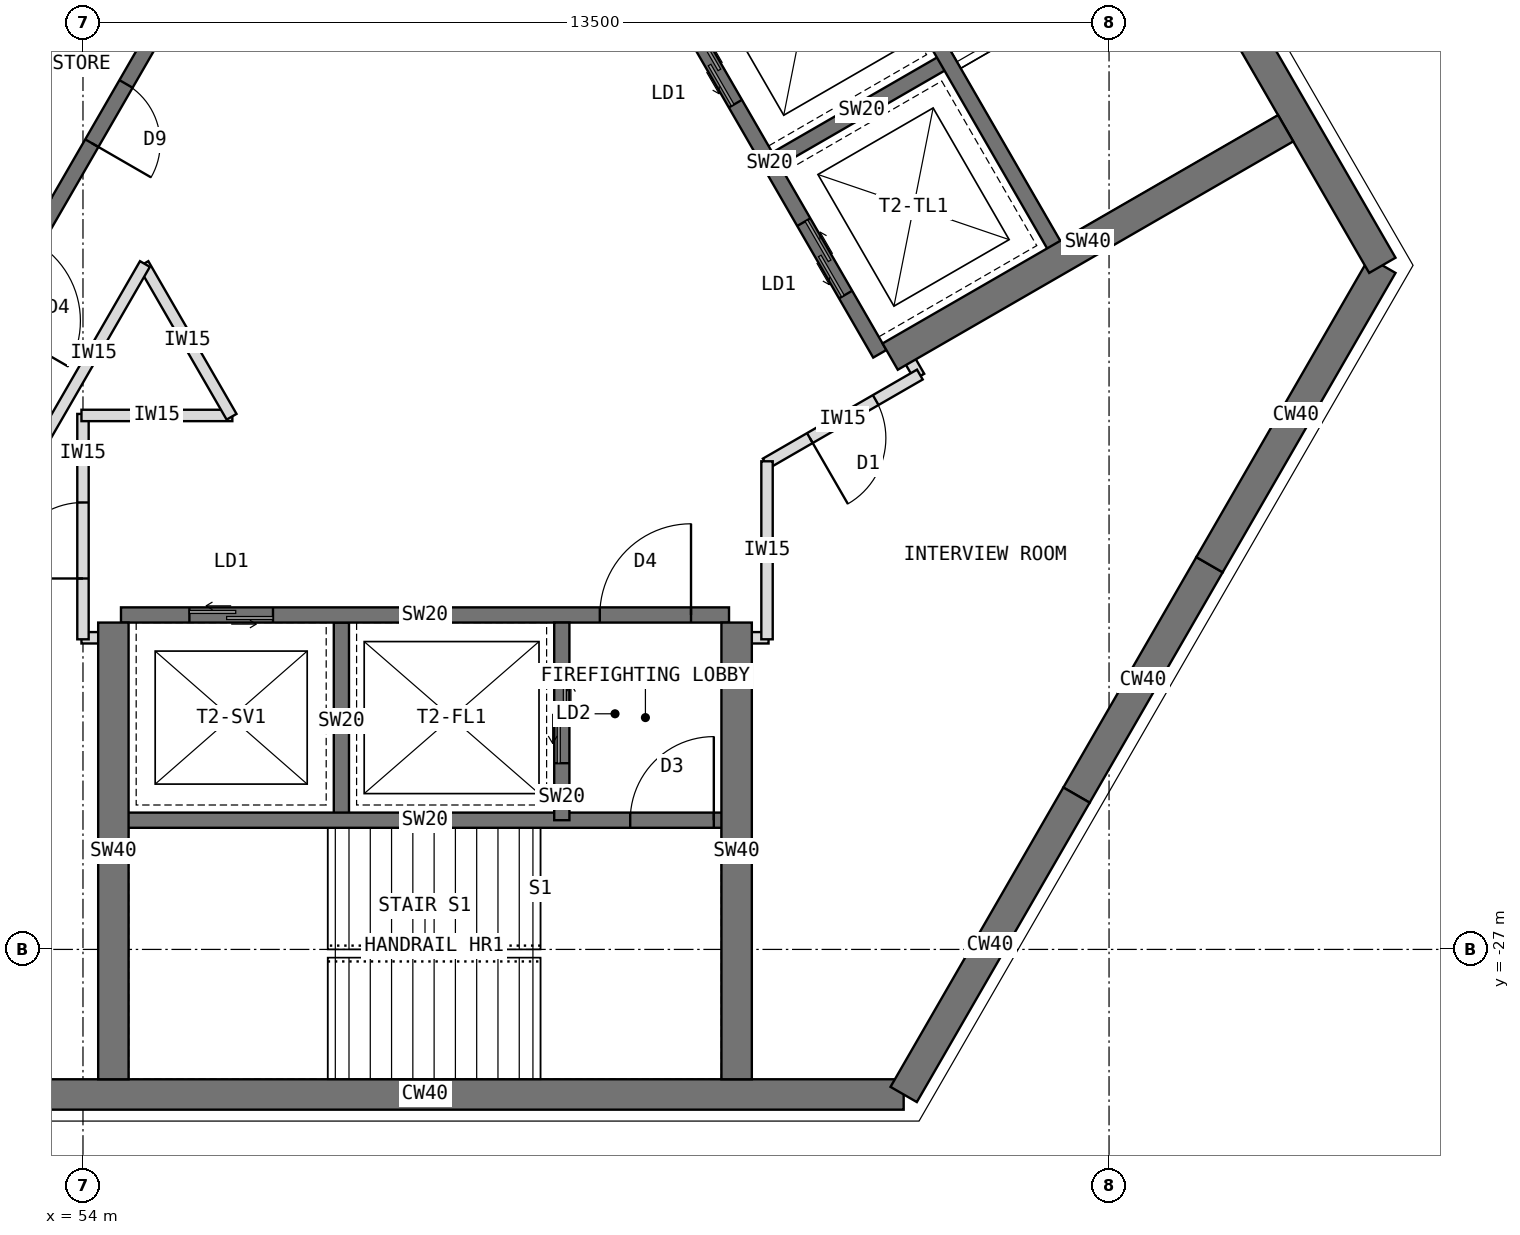
"""IFC4 building model, lengths in metres.
Left out: names, types, materials, properties, quantities, classifications, styles, units other than length and angle.
Written with IfcOpenShell. Run it as: python <this file> out.ifc"""

import sys

from ifc_helpers import new_model, si_unit, direction, frame, frame_2d, origin, place, context, subcontext, project, spatial, rectangle, extrude, element, fill, save


model = new_model("IFC4")
c1 = context("Model", 3, precision=1e-05, world=origin(), true_north=direction((0.0, 1.0)))
c2 = subcontext(c1, "Body", "Model", "MODEL_VIEW")
j1 = project(units=[si_unit("LENGTHUNIT", "METRE"), si_unit("PLANEANGLEUNIT", "RADIAN")], contexts=[c1])
p1 = place(None, origin())
s1 = spatial("IfcSite", under=j1, at=p1, CompositionType="ELEMENT")
p2 = place(p1, origin())
s2 = spatial("IfcBuilding", under=s1, at=p2, CompositionType="ELEMENT")
p3 = place(p2, frame((0.0, 0.0, 259.5)))
s3 = spatial("IfcBuildingStorey", under=s2, at=p3, CompositionType="ELEMENT", Elevation=259.5)
p4 = place(p3, frame((52.202, -28.908, 0.0), z_axis=(0.0, 0.0, 1.0), x_axis=(1.0, 0.0, 0.0)))
e1 = element("IfcWall", 1, at=p4, inside=s3, PredefinedType="SHEAR", context=c2, shape_type="SweptSolid", body=[
    extrude(rectangle(XDim=12.596, YDim=0.4, at=frame_2d((6.298, 0.0))), origin(), (0.0, 0.0, 1.0), 4.0),
])
p5 = place(p3, frame((64.798, -28.908, 0.0), z_axis=(0.0, 0.0, 1.0), x_axis=(0.499984222037, 0.866034513004, 0.0)))
e2 = element("IfcWall", 2, at=p5, inside=s3, PredefinedType="SHEAR", context=c2, shape_type="SweptSolid", body=[
    extrude(rectangle(XDim=4.548, YDim=0.4, at=frame_2d((2.274, 0.0))), origin(), (0.0, 0.0, 1.0), 4.0),
])
p6 = place(p3, frame((67.072, -24.97, 0.0), z_axis=(0.0, 0.0, 1.0), x_axis=(0.500010275428, 0.866019471182, 0.0)))
e3 = element("IfcWall", 3, at=p6, inside=s3, PredefinedType="SHEAR", context=c2, shape_type="SweptSolid", body=[
    extrude(rectangle(XDim=3.5, YDim=0.4, at=frame_2d((1.75, 0.0))), origin(), (0.0, 0.0, 1.0), 4.0),
])
p7 = place(p3, frame((68.822, -21.939, 0.0), z_axis=(0.0, 0.0, 1.0), x_axis=(0.500024481964, 0.866011268655, 0.0)))
e4 = element("IfcWall", 4, at=p7, inside=s3, PredefinedType="SHEAR", context=c2, shape_type="SweptSolid", body=[
    extrude(rectangle(XDim=4.548, YDim=0.4, at=frame_2d((2.274, 0.0))), origin(), (0.0, 0.0, 1.0), 4.0),
])
p8 = place(p3, frame((71.096, -18.0, 0.0), z_axis=(0.0, 0.0, 1.0), x_axis=(-0.500005998175, 0.866021940709, 0.0)))
e5 = element("IfcWall", 5, at=p8, inside=s3, PredefinedType="SHEAR", context=c2, shape_type="SweptSolid", body=[
    extrude(rectangle(XDim=12.596, YDim=0.4, at=frame_2d((6.298, 0.0))), origin(), (0.0, 0.0, 1.0), 4.0),
])
p9 = place(p3, frame((56.516, -12.236, 0.0), z_axis=(0.0, 0.0, 1.0), x_axis=(-0.49999894854, -0.866026010844, 0.0)))
e6 = element("IfcWall", 6, at=p9, inside=s3, PredefinedType="SHEAR", context=c2, shape_type="SweptSolid", body=[
    extrude(rectangle(XDim=8.0, YDim=0.2, at=frame_2d((4.0, 0.0))), origin(), (0.0, 0.0, 1.0), 4.0),
])
p10 = place(p9, frame((6.3, 0.0, 0.0)))
e7 = element("IfcOpeningElement", 7, at=p10, cuts=e6, PredefinedType="OPENING", context=c2, shape_type="SweptSolid", body=[
    extrude(rectangle(XDim=1.2, YDim=2.1, at=frame_2d((0.6, 1.05))), frame((0.0, 0.11, 0.0), z_axis=(0.0, -1.0, 0.0), x_axis=(1.0, 0.0, 0.0)), (0.0, 0.0, 1.0), 0.22),
])
p11 = place(p9, frame((1.0, 0.0, 0.0)))
e8 = element("IfcOpeningElement", 8, at=p11, cuts=e6, PredefinedType="OPENING", context=c2, shape_type="SweptSolid", body=[
    extrude(rectangle(XDim=0.9, YDim=2.1, at=frame_2d((0.45, 1.05))), frame((0.0, 0.11, 0.0), z_axis=(0.0, -1.0, 0.0), x_axis=(1.0, 0.0, 0.0)), (0.0, 0.0, 1.0), 0.22),
])
p12 = place(p9, frame((3.9, 0.0, 0.0)))
e9 = element("IfcOpeningElement", 9, at=p12, cuts=e6, PredefinedType="OPENING", context=c2, shape_type="SweptSolid", body=[
    extrude(rectangle(XDim=0.9, YDim=2.1, at=frame_2d((0.45, 1.05))), frame((0.0, 0.11, 0.0), z_axis=(0.0, -1.0, 0.0), x_axis=(1.0, 0.0, 0.0)), (0.0, 0.0, 1.0), 0.22),
])
p13 = place(p3, frame((54.178, -10.886, 0.0), z_axis=(0.0, 0.0, 1.0), x_axis=(-0.49999894854, -0.866026010844, 0.0)))
e10 = element("IfcWall", 10, at=p13, inside=s3, PredefinedType="SHEAR", context=c2, shape_type="SweptSolid", body=[
    extrude(rectangle(XDim=8.0, YDim=0.2, at=frame_2d((4.0, 0.0))), origin(), (0.0, 0.0, 1.0), 4.0),
])
p14 = place(p13, frame((6.8, 0.0, 0.0)))
e11 = element("IfcOpeningElement", 11, at=p14, cuts=e10, PredefinedType="OPENING", context=c2, shape_type="SweptSolid", body=[
    extrude(rectangle(XDim=0.9, YDim=2.1, at=frame_2d((0.45, 1.05))), frame((0.0, 0.11, 0.0), z_axis=(0.0, -1.0, 0.0), x_axis=(1.0, 0.0, 0.0)), (0.0, 0.0, 1.0), 0.22),
])
p15 = place(p3, frame((54.5, -22.6, 0.0), z_axis=(0.0, 0.0, 1.0), x_axis=(1.0, 0.0, 0.0)))
e12 = element("IfcWall", 12, at=p15, inside=s3, PredefinedType="SHEAR", context=c2, shape_type="SweptSolid", body=[
    extrude(rectangle(XDim=8.0, YDim=0.2, at=frame_2d((4.0, 0.0))), origin(), (0.0, 0.0, 1.0), 4.0),
])
p16 = place(p15, frame((6.3, 0.0, 0.0)))
e13 = element("IfcOpeningElement", 13, at=p16, cuts=e12, PredefinedType="OPENING", context=c2, shape_type="SweptSolid", body=[
    extrude(rectangle(XDim=1.2, YDim=2.1, at=frame_2d((0.6, 1.05))), frame((0.0, 0.11, 0.0), z_axis=(0.0, -1.0, 0.0), x_axis=(1.0, 0.0, 0.0)), (0.0, 0.0, 1.0), 0.22),
])
p17 = place(p15, frame((0.9, 0.0, 0.0)))
e14 = element("IfcOpeningElement", 14, at=p17, cuts=e12, PredefinedType="OPENING", context=c2, shape_type="SweptSolid", body=[
    extrude(rectangle(XDim=1.1, YDim=2.2, at=frame_2d((0.55, 1.1))), frame((0.0, 0.11, 0.0), z_axis=(0.0, -1.0, 0.0), x_axis=(1.0, 0.0, 0.0)), (0.0, 0.0, 1.0), 0.22),
])
p18 = place(p3, frame((57.4, -22.7, 0.0), z_axis=(0.0, 0.0, 1.0), x_axis=(0.0, -1.0, 0.0)))
e15 = element("IfcWall", 15, at=p18, inside=s3, PredefinedType="SHEAR", context=c2, shape_type="SweptSolid", body=[
    extrude(rectangle(XDim=2.6, YDim=0.2, at=frame_2d((1.3, 0.0))), origin(), (0.0, 0.0, 1.0), 4.0),
])
p19 = place(p3, frame((60.3, -22.7, 0.0), z_axis=(0.0, 0.0, 1.0), x_axis=(0.0, -1.0, 0.0)))
e16 = element("IfcWall", 16, at=p19, inside=s3, PredefinedType="SHEAR", context=c2, shape_type="SweptSolid", body=[
    extrude(rectangle(XDim=2.6, YDim=0.2, at=frame_2d((1.3, 0.0))), origin(), (0.0, 0.0, 1.0), 4.0),
])
p20 = place(p19, frame((0.55, 0.0, 0.0)))
e17 = element("IfcOpeningElement", 17, at=p20, cuts=e16, PredefinedType="OPENING", context=c2, shape_type="SweptSolid", body=[
    extrude(rectangle(XDim=1.3, YDim=2.2, at=frame_2d((0.65, 1.1))), frame((0.0, 0.11, 0.0), z_axis=(0.0, -1.0, 0.0), x_axis=(1.0, 0.0, 0.0)), (0.0, 0.0, 1.0), 0.22),
])
p21 = place(p3, frame((54.5, -25.3, 0.0), z_axis=(0.0, 0.0, 1.0), x_axis=(1.0, 0.0, 0.0)))
e18 = element("IfcWall", 18, at=p21, inside=s3, PredefinedType="SHEAR", context=c2, shape_type="SweptSolid", body=[
    extrude(rectangle(XDim=8.0, YDim=0.2, at=frame_2d((4.0, 0.0))), origin(), (0.0, 0.0, 1.0), 4.0),
])
p22 = place(p21, frame((6.7, 0.0, 0.0)))
e19 = element("IfcOpeningElement", 19, at=p22, cuts=e18, PredefinedType="OPENING", context=c2, shape_type="SweptSolid", body=[
    extrude(rectangle(XDim=1.1, YDim=2.1, at=frame_2d((0.55, 1.05))), frame((0.0, 0.11, 0.0), z_axis=(0.0, -1.0, 0.0), x_axis=(1.0, 0.0, 0.0)), (0.0, 0.0, 1.0), 0.22),
])
for number, where, z_axis, x_axis in (
    (20, (62.6, -22.7, 0.0), (0.0, 0.0, 1.0), (0.0, -1.0, 0.0)),
    (21, (54.4, -22.7, 0.0), (0.0, 0.0, 1.0), (0.0, -1.0, 0.0)),
):
    element("IfcWall", number, at=place(p3, frame(where, z_axis=z_axis, x_axis=x_axis)), inside=s3, PredefinedType="SHEAR", context=c2, shape_type="SweptSolid", body=[
        extrude(rectangle(XDim=6.008, YDim=0.4, at=frame_2d((3.004, 0.0))), origin(), (0.0, 0.0, 1.0), 4.0),
    ])
p23 = place(p3, frame((64.484, -19.164, 0.0), z_axis=(0.0, 0.0, 1.0), x_axis=(-0.49999894854, 0.866026010844, 0.0)))
e22 = element("IfcWall", 22, at=p23, inside=s3, PredefinedType="SHEAR", context=c2, shape_type="SweptSolid", body=[
    extrude(rectangle(XDim=8.0, YDim=0.2, at=frame_2d((4.0, 0.0))), origin(), (0.0, 0.0, 1.0), 4.0),
])
p24 = place(p23, frame((6.3, 0.0, 0.0)))
e23 = element("IfcOpeningElement", 23, at=p24, cuts=e22, PredefinedType="OPENING", context=c2, shape_type="SweptSolid", body=[
    extrude(rectangle(XDim=1.2, YDim=2.1, at=frame_2d((0.6, 1.05))), frame((0.0, 0.11, 0.0), z_axis=(0.0, -1.0, 0.0), x_axis=(1.0, 0.0, 0.0)), (0.0, 0.0, 1.0), 0.22),
])
p25 = place(p23, frame((0.9, 0.0, 0.0)))
e24 = element("IfcOpeningElement", 24, at=p25, cuts=e22, PredefinedType="OPENING", context=c2, shape_type="SweptSolid", body=[
    extrude(rectangle(XDim=1.1, YDim=2.2, at=frame_2d((0.55, 1.1))), frame((0.0, 0.11, 0.0), z_axis=(0.0, -1.0, 0.0), x_axis=(1.0, 0.0, 0.0)), (0.0, 0.0, 1.0), 0.22),
])
p26 = place(p23, frame((3.8, 0.0, 0.0)))
e25 = element("IfcOpeningElement", 25, at=p26, cuts=e22, PredefinedType="OPENING", context=c2, shape_type="SweptSolid", body=[
    extrude(rectangle(XDim=1.1, YDim=2.2, at=frame_2d((0.55, 1.1))), frame((0.0, 0.11, 0.0), z_axis=(0.0, -1.0, 0.0), x_axis=(1.0, 0.0, 0.0)), (0.0, 0.0, 1.0), 0.22),
])
p27 = place(p3, frame((63.12, -16.603, 0.0), z_axis=(0.0, 0.0, 1.0), x_axis=(0.866062058628, 0.499936506574, 0.0)))
e26 = element("IfcWall", 26, at=p27, inside=s3, PredefinedType="SHEAR", context=c2, shape_type="SweptSolid", body=[
    extrude(rectangle(XDim=2.6, YDim=0.2, at=frame_2d((1.3, 0.0))), origin(), (0.0, 0.0, 1.0), 4.0),
])
p28 = place(p3, frame((66.822, -17.814, 0.0), z_axis=(0.0, 0.0, 1.0), x_axis=(-0.49999894854, 0.866026010844, 0.0)))
e27 = element("IfcWall", 27, at=p28, inside=s3, PredefinedType="SHEAR", context=c2, shape_type="SweptSolid", body=[
    extrude(rectangle(XDim=8.0, YDim=0.2, at=frame_2d((4.0, 0.0))), origin(), (0.0, 0.0, 1.0), 4.0),
])
p29 = place(p28, frame((6.7, 0.0, 0.0)))
e28 = element("IfcOpeningElement", 28, at=p29, cuts=e27, PredefinedType="OPENING", context=c2, shape_type="SweptSolid", body=[
    extrude(rectangle(XDim=1.1, YDim=2.1, at=frame_2d((0.55, 1.05))), frame((0.0, 0.11, 0.0), z_axis=(0.0, -1.0, 0.0), x_axis=(1.0, 0.0, 0.0)), (0.0, 0.0, 1.0), 0.22),
])
p30 = place(p3, frame((64.62, -19.201, 0.0), z_axis=(0.0, 0.0, 1.0), x_axis=(0.866026570101, 0.499997979876, 0.0)))
e29 = element("IfcWall", 29, at=p30, inside=s3, PredefinedType="SHEAR", context=c2, shape_type="SweptSolid", body=[
    extrude(rectangle(XDim=6.008, YDim=0.4, at=frame_2d((3.004, 0.0))), origin(), (0.0, 0.0, 1.0), 4.0),
])
for number, where, z_axis, x_axis in (
    (30, (63.02, -22.9, 0.0), (0.0, 0.0, 1.0), (-1.0, 0.0, 0.0)),
    (31, (54.41, -22.9, 0.0), (0.0, 0.0, 1.0), (-1.0, 0.0, 0.0)),
):
    element("IfcWall", number, at=place(p3, frame(where, z_axis=z_axis, x_axis=x_axis)), inside=s3, PredefinedType="PARTITIONING", context=c2, shape_type="SweptSolid", body=[
        extrude(rectangle(XDim=0.43, YDim=0.15, at=frame_2d((0.215, 0.0))), origin(), (0.0, 0.0, 1.0), 3.8),
    ])
p31 = place(p3, frame((54.0, -22.92, 0.0), z_axis=(0.0, 0.0, 1.0), x_axis=(0.0, 1.0, 0.0)))
e32 = element("IfcWall", 32, at=p31, inside=s3, PredefinedType="PARTITIONING", context=c2, shape_type="SweptSolid", body=[
    extrude(rectangle(XDim=2.965, YDim=0.15, at=frame_2d((1.482, 0.0))), origin(), (0.0, 0.0, 1.0), 3.8),
])
p32 = place(p31, frame((0.8, 0.0, 0.0)))
e33 = element("IfcOpeningElement", 33, at=p32, cuts=e32, PredefinedType="OPENING", context=c2, shape_type="SweptSolid", body=[
    extrude(rectangle(XDim=1.0, YDim=2.1, at=frame_2d((0.5, 1.05))), frame((0.0, 0.085, 0.0), z_axis=(0.0, -1.0, 0.0), x_axis=(1.0, 0.0, 0.0)), (0.0, 0.0, 1.0), 0.17),
])
p33 = place(p3, frame((53.98, -19.975, 0.0), z_axis=(0.0, 0.0, 1.0), x_axis=(1.0, 0.0, 0.0)))
e34 = element("IfcWall", 34, at=p33, inside=s3, PredefinedType="PARTITIONING", context=c2, shape_type="SweptSolid", body=[
    extrude(rectangle(XDim=1.985, YDim=0.15, at=frame_2d((0.993, 0.0))), origin(), (0.0, 0.0, 1.0), 3.8),
])
p34 = place(p3, frame((55.955, -19.992, 0.0), z_axis=(0.0, 0.0, 1.0), x_axis=(-0.499941024108, 0.866059450854, 0.0)))
e35 = element("IfcWall", 35, at=p34, inside=s3, PredefinedType="PARTITIONING", context=c2, shape_type="SweptSolid", body=[
    extrude(rectangle(XDim=2.321, YDim=0.15, at=frame_2d((1.16, 0.0))), origin(), (0.0, 0.0, 1.0), 3.8),
])
p35 = place(p3, frame((54.815, -17.983, 0.0), z_axis=(0.0, 0.0, 1.0), x_axis=(-0.499981473571, -0.866036099759, 0.0)))
e36 = element("IfcWall", 36, at=p35, inside=s3, PredefinedType="PARTITIONING", context=c2, shape_type="SweptSolid", body=[
    extrude(rectangle(XDim=2.692, YDim=0.15, at=frame_2d((1.346, 0.0))), origin(), (0.0, 0.0, 1.0), 3.8),
])
p36 = place(p3, frame((64.789, -19.092, 0.0), z_axis=(0.0, 0.0, 1.0), x_axis=(0.499804398801, -0.866138304741, 0.0)))
e37 = element("IfcWall", 37, at=p36, inside=s3, PredefinedType="PARTITIONING", context=c2, shape_type="SweptSolid", body=[
    extrude(rectangle(XDim=0.43, YDim=0.15, at=frame_2d((0.215, 0.0))), origin(), (0.0, 0.0, 1.0), 3.8),
])
p37 = place(p3, frame((65.011, -19.437, 0.0), z_axis=(0.0, 0.0, 1.0), x_axis=(-0.865982457891, -0.500074377092, 0.0)))
e38 = element("IfcWall", 38, at=p37, inside=s3, PredefinedType="PARTITIONING", context=c2, shape_type="SweptSolid", body=[
    extrude(rectangle(XDim=2.342, YDim=0.15, at=frame_2d((1.171, 0.0))), origin(), (0.0, 0.0, 1.0), 3.8),
])
p38 = place(p37, frame((0.671, 0.0, 0.0)))
e39 = element("IfcOpeningElement", 39, at=p38, cuts=e38, PredefinedType="OPENING", context=c2, shape_type="SweptSolid", body=[
    extrude(rectangle(XDim=1.0, YDim=2.1, at=frame_2d((0.5, 1.05))), frame((0.0, 0.085, 0.0), z_axis=(0.0, -1.0, 0.0), x_axis=(1.0, 0.0, 0.0)), (0.0, 0.0, 1.0), 0.17),
])
p39 = place(p3, frame((63.0, -20.578, 0.0), z_axis=(0.0, 0.0, 1.0), x_axis=(0.0, -1.0, 0.0)))
e40 = element("IfcWall", 40, at=p39, inside=s3, PredefinedType="PARTITIONING", context=c2, shape_type="SweptSolid", body=[
    extrude(rectangle(XDim=2.342, YDim=0.15, at=frame_2d((1.171, 0.0))), origin(), (0.0, 0.0, 1.0), 3.8),
])
p40 = place(p16, origin())
e41 = element("IfcDoor", 41, at=p40, inside=s3, OperationType="SINGLE_SWING_RIGHT", PredefinedType="DOOR", context=c2, shape_type="SweptSolid", body=[
    extrude(rectangle(XDim=1.2, YDim=2.1, at=frame_2d((0.6, 1.05))), frame((0.0, 0.025, 0.0), z_axis=(0.0, -1.0, 0.0), x_axis=(1.0, 0.0, 0.0)), (0.0, 0.0, 1.0), 0.05),
])
fill(e13, e41)
p41 = place(p20, origin())
e42 = element("IfcDoor", 42, at=p41, inside=s3, OperationType="DOUBLE_DOOR_SLIDING", PredefinedType="DOOR", context=c2, shape_type="SweptSolid", body=[
    extrude(rectangle(XDim=1.3, YDim=2.2, at=frame_2d((0.65, 1.1))), frame((0.0, 0.025, 0.0), z_axis=(0.0, -1.0, 0.0), x_axis=(1.0, 0.0, 0.0)), (0.0, 0.0, 1.0), 0.05),
])
fill(e17, e42)
p42 = place(p17, origin())
e43 = element("IfcDoor", 43, at=p42, inside=s3, OperationType="DOUBLE_DOOR_SLIDING", PredefinedType="DOOR", context=c2, shape_type="SweptSolid", body=[
    extrude(rectangle(XDim=1.1, YDim=2.2, at=frame_2d((0.55, 1.1))), frame((0.0, 0.025, 0.0), z_axis=(0.0, -1.0, 0.0), x_axis=(1.0, 0.0, 0.0)), (0.0, 0.0, 1.0), 0.05),
])
fill(e14, e43)
p43 = place(p22, origin())
e44 = element("IfcDoor", 44, at=p43, inside=s3, OperationType="SINGLE_SWING_RIGHT", PredefinedType="DOOR", context=c2, shape_type="SweptSolid", body=[
    extrude(rectangle(XDim=1.1, YDim=2.1, at=frame_2d((0.55, 1.05))), frame((0.0, 0.025, 0.0), z_axis=(0.0, -1.0, 0.0), x_axis=(1.0, 0.0, 0.0)), (0.0, 0.0, 1.0), 0.05),
])
fill(e19, e44)
p44 = place(p25, origin())
e45 = element("IfcDoor", 45, at=p44, inside=s3, OperationType="DOUBLE_DOOR_SLIDING", PredefinedType="DOOR", context=c2, shape_type="SweptSolid", body=[
    extrude(rectangle(XDim=1.1, YDim=2.2, at=frame_2d((0.55, 1.1))), frame((0.0, 0.025, 0.0), z_axis=(0.0, -1.0, 0.0), x_axis=(1.0, 0.0, 0.0)), (0.0, 0.0, 1.0), 0.05),
])
fill(e24, e45)
p45 = place(p26, origin())
e46 = element("IfcDoor", 46, at=p45, inside=s3, OperationType="DOUBLE_DOOR_SLIDING", PredefinedType="DOOR", context=c2, shape_type="SweptSolid", body=[
    extrude(rectangle(XDim=1.1, YDim=2.2, at=frame_2d((0.55, 1.1))), frame((0.0, 0.025, 0.0), z_axis=(0.0, -1.0, 0.0), x_axis=(1.0, 0.0, 0.0)), (0.0, 0.0, 1.0), 0.05),
])
fill(e25, e46)
p46 = place(p32, origin())
e47 = element("IfcDoor", 47, at=p46, inside=s3, OperationType="SINGLE_SWING_LEFT", PredefinedType="DOOR", context=c2, shape_type="SweptSolid", body=[
    extrude(rectangle(XDim=1.0, YDim=2.1, at=frame_2d((0.5, 1.05))), frame((0.0, 0.025, 0.0), z_axis=(0.0, -1.0, 0.0), x_axis=(1.0, 0.0, 0.0)), (0.0, 0.0, 1.0), 0.05),
])
fill(e33, e47)
p47 = place(p38, origin())
e48 = element("IfcDoor", 48, at=p47, inside=s3, OperationType="SINGLE_SWING_RIGHT", PredefinedType="DOOR", context=c2, shape_type="SweptSolid", body=[
    extrude(rectangle(XDim=1.0, YDim=2.1, at=frame_2d((0.5, 1.05))), frame((0.0, 0.025, 0.0), z_axis=(0.0, -1.0, 0.0), x_axis=(1.0, 0.0, 0.0)), (0.0, 0.0, 1.0), 0.05),
])
fill(e39, e48)
p48 = place(p12, origin())
e49 = element("IfcDoor", 49, at=p48, inside=s3, OperationType="SINGLE_SWING_RIGHT", PredefinedType="DOOR", context=c2, shape_type="SweptSolid", body=[
    extrude(rectangle(XDim=0.9, YDim=2.1, at=frame_2d((0.45, 1.05))), frame((0.0, 0.025, 0.0), z_axis=(0.0, -1.0, 0.0), x_axis=(1.0, 0.0, 0.0)), (0.0, 0.0, 1.0), 0.05),
])
fill(e9, e49)
save(model, sys.argv[1])
